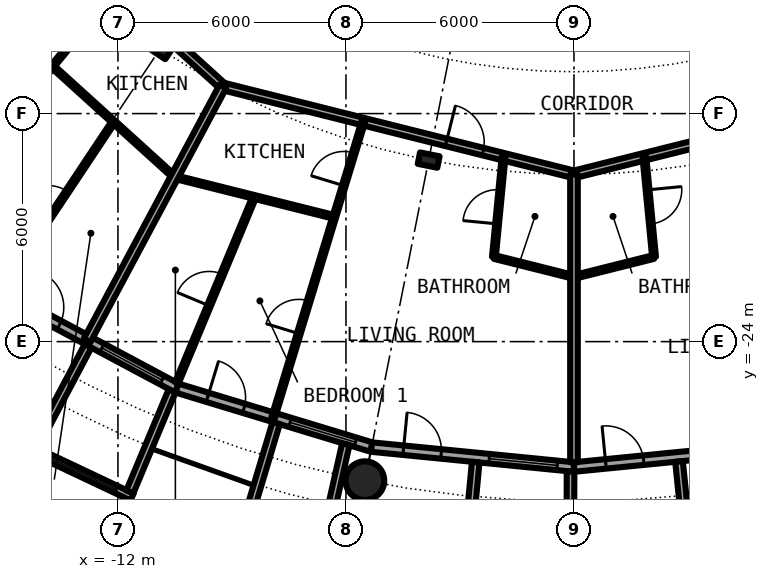
"""IFC4 building model, lengths in metres.
Left out: names, types, materials, properties, quantities, classifications, styles, units other than length and angle.
Written with IfcOpenShell. Run it as: python <this file> out.ifc"""

import sys

from ifc_helpers import new_model, si_unit, direction, frame, frame_2d, origin, origin_2d, place, context, subcontext, project, spatial, rectangle, circle, hollow_circle, i_section, extrude, element, fill, save


model = new_model("IFC4")
c1 = context("Model", 3, precision=1e-05, world=origin(), true_north=direction((0.0, 1.0)))
c2 = subcontext(c1, "Body", "Model", "MODEL_VIEW")
j1 = project(units=[si_unit("LENGTHUNIT", "METRE"), si_unit("PLANEANGLEUNIT", "RADIAN")], contexts=[c1])
p1 = place(None, origin())
s1 = spatial("IfcSite", under=j1, at=p1, CompositionType="ELEMENT")
p2 = place(p1, origin())
s2 = spatial("IfcBuilding", under=s1, at=p2, CompositionType="ELEMENT")
p3 = place(p2, frame((0.0, 0.0, 81.9)))
s3 = spatial("IfcBuildingStorey", under=s2, at=p3, CompositionType="ELEMENT", Elevation=81.9)
p4 = place(p3, frame((-5.501, -27.658, 0.0), z_axis=(0.0, 0.0, 1.0), x_axis=(1.0, 0.0, 0.0)))
e1 = element("IfcColumn", 1, at=p4, inside=s3, PredefinedType="COLUMN", context=c2, shape_type="SweptSolid", body=[
    extrude(hollow_circle(Radius=0.508, WallThickness=0.04, at=origin_2d()), origin(), (0.0, 0.0, 1.0), 3.05),
])
for number, where, z_axis, x_axis in (
    (2, (-10.889, -16.297, 0.0), (0.0, 0.0, 1.0), (-0.556, -0.831, 0.0)),
    (3, (-3.824, -19.223, 0.0), (0.0, 0.0, 1.0), (-0.195, -0.981, 0.0)),
):
    element("IfcColumn", number, at=place(p3, frame(where, z_axis=z_axis, x_axis=x_axis)), inside=s3, PredefinedType="COLUMN", context=c2, shape_type="SweptSolid", body=[
        extrude(i_section(OverallWidth=0.306, OverallDepth=0.524, WebThickness=0.021, FlangeThickness=0.04, FilletRadius=0.027, at=origin_2d()), origin(), (0.0, 0.0, 1.0), 3.05),
    ])
p5 = place(p3, frame((-15.167, -22.699, 0.0), z_axis=(0.0, 0.0, 1.0), x_axis=(0.881915646801, -0.471407246368, 0.0)))
e4 = element("IfcWall", 4, at=p5, inside=s3, PredefinedType="SOLIDWALL", context=c2, shape_type="SweptSolid", body=[
    extrude(rectangle(XDim=5.352, YDim=0.25, at=frame_2d((2.676, 0.0))), origin(), (0.0, 0.0, 1.0), 2.7),
])
p6 = place(p5, frame((0.841, 0.0, 0.0)))
e5 = element("IfcOpeningElement", 5, at=p6, cuts=e4, PredefinedType="OPENING", context=c2, shape_type="SweptSolid", body=[
    extrude(rectangle(XDim=1.0, YDim=2.2, at=frame_2d((0.5, 1.1))), frame((0.0, 0.135, 0.0), z_axis=(0.0, -1.0, 0.0), x_axis=(1.0, 0.0, 0.0)), (0.0, 0.0, 1.0), 0.27),
])
p7 = place(p5, frame((3.111, 0.0, 0.3)))
e6 = element("IfcOpeningElement", 6, at=p7, cuts=e4, PredefinedType="OPENING", context=c2, shape_type="SweptSolid", body=[
    extrude(rectangle(XDim=1.8, YDim=2.1, at=frame_2d((0.9, 1.05))), frame((0.0, 0.135, 0.0), z_axis=(0.0, -1.0, 0.0), x_axis=(1.0, 0.0, 0.0)), (0.0, 0.0, 1.0), 0.27),
])
p8 = place(p3, frame((-14.335, -26.808, -0.03), z_axis=(0.0, 0.0, 1.0), x_axis=(0.904000060331, -0.427532327342, 0.0)))
e7 = element("IfcWall", 7, at=p8, inside=s3, PredefinedType="SOLIDWALL", context=c2, shape_type="SweptSolid", body=[
    extrude(rectangle(XDim=2.993, YDim=0.2, at=frame_2d((1.497, 0.0))), origin(), (0.0, 0.0, 1.0), 2.73),
])
p9 = place(p8, frame((0.457, 0.0, 0.33)))
e8 = element("IfcOpeningElement", 8, at=p9, cuts=e7, PredefinedType="OPENING", context=c2, shape_type="SweptSolid", body=[
    extrude(circle(Radius=1.04, at=frame_2d((1.04, 1.04))), frame((0.0, 0.11, 0.0), z_axis=(0.0, -1.0, 0.0), x_axis=(1.0, 0.0, 0.0)), (0.0, 0.0, 1.0), 0.22),
])
p10 = place(p3, frame((-12.787, -24.113, -0.03), z_axis=(0.0, 0.0, 1.0), x_axis=(-0.468365282436, -0.883534924159, 0.0)))
e9 = element("IfcWall", 9, at=p10, inside=s3, PredefinedType="SOLIDWALL", context=c2, shape_type="SweptSolid", body=[
    extrude(rectangle(XDim=3.006, YDim=0.2, at=frame_2d((1.503, 0.0))), origin(), (0.0, 0.0, 1.0), 2.73),
])
p11 = place(p3, frame((-10.575, -25.295, -0.03), z_axis=(0.0, 0.0, 1.0), x_axis=(-0.385697364644, -0.922625353492, 0.0)))
e10 = element("IfcWall", 10, at=p11, inside=s3, PredefinedType="SOLIDWALL", context=c2, shape_type="SweptSolid", body=[
    extrude(rectangle(XDim=2.883, YDim=0.2, at=frame_2d((1.442, 0.0))), origin(), (0.0, 0.0, 1.0), 2.73),
])
p12 = place(p3, frame((-10.447, -25.222, 0.0), z_axis=(0.0, 0.0, 1.0), x_axis=(0.956965678721, -0.290201119486, 0.0)))
e11 = element("IfcWall", 11, at=p12, inside=s3, PredefinedType="SOLIDWALL", context=c2, shape_type="SweptSolid", body=[
    extrude(rectangle(XDim=5.351, YDim=0.25, at=frame_2d((2.676, 0.0))), origin(), (0.0, 0.0, 1.0), 2.7),
])
p13 = place(p12, frame((0.841, 0.0, 0.0)))
e12 = element("IfcOpeningElement", 12, at=p13, cuts=e11, PredefinedType="OPENING", context=c2, shape_type="SweptSolid", body=[
    extrude(rectangle(XDim=1.0, YDim=2.2, at=frame_2d((0.5, 1.1))), frame((0.0, 0.135, 0.0), z_axis=(0.0, -1.0, 0.0), x_axis=(1.0, 0.0, 0.0)), (0.0, 0.0, 1.0), 0.27),
])
p14 = place(p12, frame((3.111, 0.0, 0.3)))
e13 = element("IfcOpeningElement", 13, at=p14, cuts=e11, PredefinedType="OPENING", context=c2, shape_type="SweptSolid", body=[
    extrude(rectangle(XDim=1.8, YDim=2.1, at=frame_2d((0.9, 1.05))), frame((0.0, 0.135, 0.0), z_axis=(0.0, -1.0, 0.0), x_axis=(1.0, 0.0, 0.0)), (0.0, 0.0, 1.0), 0.27),
])
p15 = place(p3, frame((-7.837, -26.144, -0.03), z_axis=(0.0, 0.0, 1.0), x_axis=(-0.287064767992, -0.957911174889, 0.0)))
e14 = element("IfcWall", 14, at=p15, inside=s3, PredefinedType="SOLIDWALL", context=c2, shape_type="SweptSolid", body=[
    extrude(rectangle(XDim=3.006, YDim=0.2, at=frame_2d((1.503, 0.0))), origin(), (0.0, 0.0, 1.0), 2.73),
])
p16 = place(p3, frame((-6.004, -26.7, -0.03), z_axis=(0.0, 0.0, 1.0), x_axis=(-0.219609259383, -0.975587911566, 0.0)))
e15 = element("IfcWall", 15, at=p16, inside=s3, PredefinedType="SOLIDWALL", context=c2, shape_type="SweptSolid", body=[
    extrude(rectangle(XDim=2.933, YDim=0.2, at=frame_2d((1.466, 0.0))), origin(), (0.0, 0.0, 1.0), 2.73),
])
p17 = place(p3, frame((-5.326, -26.775, 0.0), z_axis=(0.0, 0.0, 1.0), x_axis=(0.995173996315, -0.098126026407, 0.0)))
e16 = element("IfcWall", 16, at=p17, inside=s3, PredefinedType="SOLIDWALL", context=c2, shape_type="SweptSolid", body=[
    extrude(rectangle(XDim=5.352, YDim=0.25, at=frame_2d((2.676, 0.0))), origin(), (0.0, 0.0, 1.0), 2.7),
])
p18 = place(p17, frame((0.841, 0.0, 0.0)))
e17 = element("IfcOpeningElement", 17, at=p18, cuts=e16, PredefinedType="OPENING", context=c2, shape_type="SweptSolid", body=[
    extrude(rectangle(XDim=1.0, YDim=2.2, at=frame_2d((0.5, 1.1))), frame((0.0, 0.135, 0.0), z_axis=(0.0, -1.0, 0.0), x_axis=(1.0, 0.0, 0.0)), (0.0, 0.0, 1.0), 0.27),
])
p19 = place(p17, frame((3.111, 0.0, 0.3)))
e18 = element("IfcOpeningElement", 18, at=p19, cuts=e16, PredefinedType="OPENING", context=c2, shape_type="SweptSolid", body=[
    extrude(rectangle(XDim=1.8, YDim=2.1, at=frame_2d((0.9, 1.05))), frame((0.0, 0.135, 0.0), z_axis=(0.0, -1.0, 0.0), x_axis=(1.0, 0.0, 0.0)), (0.0, 0.0, 1.0), 0.27),
])
p20 = place(p3, frame((-2.586, -27.171, -0.03), z_axis=(0.0, 0.0, 1.0), x_axis=(-0.094548432284, -0.995520262954, 0.0)))
e19 = element("IfcWall", 19, at=p20, inside=s3, PredefinedType="SOLIDWALL", context=c2, shape_type="SweptSolid", body=[
    extrude(rectangle(XDim=3.006, YDim=0.2, at=frame_2d((1.503, 0.0))), origin(), (0.0, 0.0, 1.0), 2.73),
])
p21 = place(p3, frame((-0.09, -27.417, -0.03), z_axis=(0.0, 0.0, 1.0), x_axis=(-0.00347308367, -0.999993968827, 0.0)))
e20 = element("IfcWall", 20, at=p21, inside=s3, PredefinedType="SOLIDWALL", context=c2, shape_type="SweptSolid", body=[
    extrude(rectangle(XDim=2.882, YDim=0.2, at=frame_2d((1.441, 0.0))), origin(), (0.0, 0.0, 1.0), 2.73),
])
p22 = place(p3, frame((0.0, -27.3, 0.0), z_axis=(0.0, 0.0, 1.0), x_axis=(0.995173996315, 0.098126026407, 0.0)))
e21 = element("IfcWall", 21, at=p22, inside=s3, PredefinedType="SOLIDWALL", context=c2, shape_type="SweptSolid", body=[
    extrude(rectangle(XDim=5.352, YDim=0.25, at=frame_2d((2.676, 0.0))), origin(), (0.0, 0.0, 1.0), 2.7),
])
p23 = place(p22, frame((0.841, 0.0, 0.0)))
e22 = element("IfcOpeningElement", 22, at=p23, cuts=e21, PredefinedType="OPENING", context=c2, shape_type="SweptSolid", body=[
    extrude(rectangle(XDim=1.0, YDim=2.2, at=frame_2d((0.5, 1.1))), frame((0.0, 0.135, 0.0), z_axis=(0.0, -1.0, 0.0), x_axis=(1.0, 0.0, 0.0)), (0.0, 0.0, 1.0), 0.27),
])
p24 = place(p22, frame((3.111, 0.0, 0.3)))
e23 = element("IfcOpeningElement", 23, at=p24, cuts=e21, PredefinedType="OPENING", context=c2, shape_type="SweptSolid", body=[
    extrude(rectangle(XDim=1.8, YDim=2.1, at=frame_2d((0.9, 1.05))), frame((0.0, 0.135, 0.0), z_axis=(0.0, -1.0, 0.0), x_axis=(1.0, 0.0, 0.0)), (0.0, 0.0, 1.0), 0.27),
])
p25 = place(p3, frame((2.764, -27.153, -0.03), z_axis=(0.0, 0.0, 1.0), x_axis=(0.101505487237, -0.994834979311, 0.0)))
e24 = element("IfcWall", 24, at=p25, inside=s3, PredefinedType="SOLIDWALL", context=c2, shape_type="SweptSolid", body=[
    extrude(rectangle(XDim=3.007, YDim=0.2, at=frame_2d((1.503, 0.0))), origin(), (0.0, 0.0, 1.0), 2.73),
])
p26 = place(p3, frame((-13.727, -16.754, 0.0), z_axis=(0.0, 0.0, 1.0), x_axis=(0.740840803797, -0.671680655839, 0.0)))
e25 = element("IfcWall", 25, at=p26, inside=s3, PredefinedType="PARTITIONING", context=c2, shape_type="SweptSolid", body=[
    extrude(rectangle(XDim=4.338, YDim=0.1, at=frame_2d((2.169, 0.0))), origin(), (0.0, 0.0, 1.0), 2.7),
])
p27 = place(p3, frame((-10.516, -19.666, 0.0), z_axis=(0.0, 0.0, 1.0), x_axis=(0.97005315629, -0.242892721118, 0.0)))
e26 = element("IfcWall", 26, at=p27, inside=s3, PredefinedType="PARTITIONING", context=c2, shape_type="SweptSolid", body=[
    extrude(rectangle(XDim=4.343, YDim=0.1, at=frame_2d((2.172, 0.0))), origin(), (0.0, 0.0, 1.0), 2.7),
])
for number, where, z_axis, x_axis in (
    (27, (-2.096, -21.774, 0.0), (0.0, 0.0, 1.0), (0.97, -0.243, 0.0)),
    (28, (-0.006, -22.301, 0.0), (0.0, 0.0, 1.0), (0.97, 0.243, 0.0)),
):
    element("IfcWall", number, at=place(p3, frame(where, z_axis=z_axis, x_axis=x_axis)), inside=s3, PredefinedType="PARTITIONING", context=c2, shape_type="SweptSolid", body=[
        extrude(rectangle(XDim=2.167, YDim=0.1, at=frame_2d((1.083, 0.0))), origin(), (0.0, 0.0, 1.0), 2.7),
    ])
p28 = place(p3, frame((-16.179, -10.995, 0.0), z_axis=(0.0, 0.0, 1.0), x_axis=(0.740909940942, -0.671604392044, 0.0)))
e29 = element("IfcWall", 29, at=p28, inside=s3, PredefinedType="PARTITIONING", context=c2, shape_type="SweptSolid", body=[
    extrude(rectangle(XDim=9.367, YDim=0.2, at=frame_2d((4.683, 0.0))), origin(), (0.0, 0.0, 1.0), 2.38),
])
p29 = place(p28, frame((3.152, 0.0, 0.0)))
e30 = element("IfcOpeningElement", 30, at=p29, cuts=e29, PredefinedType="OPENING", context=c2, shape_type="SweptSolid", body=[
    extrude(rectangle(XDim=1.0, YDim=2.3, at=frame_2d((0.5, 1.15))), frame((0.0, 0.11, 0.0), z_axis=(0.0, -1.0, 0.0), x_axis=(1.0, 0.0, 0.0)), (0.0, 0.0, 1.0), 0.22),
])
p30 = place(p3, frame((-9.242, -17.284, 0.0), z_axis=(0.0, 0.0, 1.0), x_axis=(0.970002158938, -0.243096301198, 0.0)))
e31 = element("IfcWall", 31, at=p30, inside=s3, PredefinedType="PARTITIONING", context=c2, shape_type="SweptSolid", body=[
    extrude(rectangle(XDim=9.528, YDim=0.2, at=frame_2d((4.764, 0.0))), origin(), (0.0, 0.0, 1.0), 2.38),
])
p31 = place(p30, frame((6.062, 0.0, 0.0)))
e32 = element("IfcOpeningElement", 32, at=p31, cuts=e31, PredefinedType="OPENING", context=c2, shape_type="SweptSolid", body=[
    extrude(rectangle(XDim=1.0, YDim=2.3, at=frame_2d((0.5, 1.15))), frame((0.0, 0.11, 0.0), z_axis=(0.0, -1.0, 0.0), x_axis=(1.0, 0.0, 0.0)), (0.0, 0.0, 1.0), 0.22),
])
p32 = place(p3, frame((0.0, -19.6, 0.0), z_axis=(0.0, 0.0, 1.0), x_axis=(0.970002158938, 0.243096301198, 0.0)))
e33 = element("IfcWall", 33, at=p32, inside=s3, PredefinedType="PARTITIONING", context=c2, shape_type="SweptSolid", body=[
    extrude(rectangle(XDim=9.528, YDim=0.2, at=frame_2d((4.764, 0.0))), origin(), (0.0, 0.0, 1.0), 2.38),
])
p33 = place(p32, frame((4.155, 0.0, 0.0)))
e34 = element("IfcOpeningElement", 34, at=p33, cuts=e33, PredefinedType="OPENING", context=c2, shape_type="SweptSolid", body=[
    extrude(rectangle(XDim=1.0, YDim=2.3, at=frame_2d((0.5, 1.15))), frame((0.0, 0.11, 0.0), z_axis=(0.0, -1.0, 0.0), x_axis=(1.0, 0.0, 0.0)), (0.0, 0.0, 1.0), 0.22),
])
p34 = place(p3, frame((-17.219, -21.023, 0.0), z_axis=(0.0, 0.0, 1.0), x_axis=(0.633664062855, 0.773608334654, 0.0)))
e35 = element("IfcWall", 35, at=p34, inside=s3, PredefinedType="PARTITIONING", context=c2, shape_type="SweptSolid", body=[
    extrude(rectangle(XDim=8.138, YDim=0.1, at=frame_2d((4.069, 0.0))), origin(), (0.0, 0.0, 1.0), 2.7),
])
p35 = place(p34, frame((6.377, 0.0, 0.0)))
e36 = element("IfcOpeningElement", 36, at=p35, cuts=e35, PredefinedType="OPENING", context=c2, shape_type="SweptSolid", body=[
    extrude(rectangle(XDim=0.9, YDim=2.3, at=frame_2d((0.45, 1.15))), frame((0.0, 0.06, 0.0), z_axis=(0.0, -1.0, 0.0), x_axis=(1.0, 0.0, 0.0)), (0.0, 0.0, 1.0), 0.12),
])
p36 = place(p34, frame((2.308, 0.0, 0.0)))
e37 = element("IfcOpeningElement", 37, at=p36, cuts=e35, PredefinedType="OPENING", context=c2, shape_type="SweptSolid", body=[
    extrude(rectangle(XDim=0.9, YDim=2.3, at=frame_2d((0.45, 1.15))), frame((0.0, 0.06, 0.0), z_axis=(0.0, -1.0, 0.0), x_axis=(1.0, 0.0, 0.0)), (0.0, 0.0, 1.0), 0.12),
])
p37 = place(p3, frame((-15.051, -22.626, 0.0), z_axis=(0.0, 0.0, 1.0), x_axis=(0.553913391217, 0.832574294, 0.0)))
e38 = element("IfcWall", 38, at=p37, inside=s3, PredefinedType="PARTITIONING", context=c2, shape_type="SweptSolid", body=[
    extrude(rectangle(XDim=5.301, YDim=0.1, at=frame_2d((2.65, 0.0))), origin(), (0.0, 0.0, 1.0), 2.7),
])
p38 = place(p37, frame((2.2, 0.0, 0.0)))
e39 = element("IfcOpeningElement", 39, at=p38, cuts=e38, PredefinedType="OPENING", context=c2, shape_type="SweptSolid", body=[
    extrude(rectangle(XDim=0.9, YDim=2.3, at=frame_2d((0.45, 1.15))), frame((0.0, 0.06, 0.0), z_axis=(0.0, -1.0, 0.0), x_axis=(1.0, 0.0, 0.0)), (0.0, 0.0, 1.0), 0.12),
])
p39 = place(p3, frame((-12.81, -23.966, 0.0), z_axis=(0.0, 0.0, 1.0), x_axis=(0.471439510802, 0.881898399848, 0.0)))
e40 = element("IfcWall", 40, at=p39, inside=s3, PredefinedType="PARTITIONING", context=c2, shape_type="SweptSolid", body=[
    extrude(rectangle(XDim=7.575, YDim=0.2, at=frame_2d((3.787, 0.0))), origin(), (0.0, 0.0, 1.0), 2.7),
])
p40 = place(p3, frame((-10.45, -25.085, 0.0), z_axis=(0.0, 0.0, 1.0), x_axis=(0.384464934183, 0.923139596369, 0.0)))
e41 = element("IfcWall", 41, at=p40, inside=s3, PredefinedType="PARTITIONING", context=c2, shape_type="SweptSolid", body=[
    extrude(rectangle(XDim=5.301, YDim=0.1, at=frame_2d((2.65, 0.0))), origin(), (0.0, 0.0, 1.0), 2.7),
])
p41 = place(p40, frame((2.2, 0.0, 0.0)))
e42 = element("IfcOpeningElement", 42, at=p41, cuts=e41, PredefinedType="OPENING", context=c2, shape_type="SweptSolid", body=[
    extrude(rectangle(XDim=0.9, YDim=2.3, at=frame_2d((0.45, 1.15))), frame((0.0, 0.06, 0.0), z_axis=(0.0, -1.0, 0.0), x_axis=(1.0, 0.0, 0.0)), (0.0, 0.0, 1.0), 0.12),
])
p42 = place(p3, frame((-7.914, -25.997, 0.0), z_axis=(0.0, 0.0, 1.0), x_axis=(0.291319167605, 0.956625915698, 0.0)))
e43 = element("IfcWall", 43, at=p42, inside=s3, PredefinedType="PARTITIONING", context=c2, shape_type="SweptSolid", body=[
    extrude(rectangle(XDim=8.139, YDim=0.1, at=frame_2d((4.07, 0.0))), origin(), (0.0, 0.0, 1.0), 2.7),
])
p43 = place(p42, frame((6.377, 0.0, 0.0)))
e44 = element("IfcOpeningElement", 44, at=p43, cuts=e43, PredefinedType="OPENING", context=c2, shape_type="SweptSolid", body=[
    extrude(rectangle(XDim=0.9, YDim=2.3, at=frame_2d((0.45, 1.15))), frame((0.0, 0.06, 0.0), z_axis=(0.0, -1.0, 0.0), x_axis=(1.0, 0.0, 0.0)), (0.0, 0.0, 1.0), 0.12),
])
p44 = place(p42, frame((2.308, 0.0, 0.0)))
e45 = element("IfcOpeningElement", 45, at=p44, cuts=e43, PredefinedType="OPENING", context=c2, shape_type="SweptSolid", body=[
    extrude(rectangle(XDim=0.9, YDim=2.3, at=frame_2d((0.45, 1.15))), frame((0.0, 0.06, 0.0), z_axis=(0.0, -1.0, 0.0), x_axis=(1.0, 0.0, 0.0)), (0.0, 0.0, 1.0), 0.12),
])
p45 = place(p3, frame((-2.107, -21.772, 0.0), z_axis=(0.0, 0.0, 1.0), x_axis=(0.09627998515, 0.995354290923, 0.0)))
e46 = element("IfcWall", 46, at=p45, inside=s3, PredefinedType="PARTITIONING", context=c2, shape_type="SweptSolid", body=[
    extrude(rectangle(XDim=2.647, YDim=0.1, at=frame_2d((1.324, 0.0))), origin(), (0.0, 0.0, 1.0), 2.7),
])
p46 = place(p45, frame((0.874, 0.0, 0.0)))
e47 = element("IfcOpeningElement", 47, at=p46, cuts=e46, PredefinedType="OPENING", context=c2, shape_type="SweptSolid", body=[
    extrude(rectangle(XDim=0.9, YDim=2.3, at=frame_2d((0.45, 1.15))), frame((0.0, 0.06, 0.0), z_axis=(0.0, -1.0, 0.0), x_axis=(1.0, 0.0, 0.0)), (0.0, 0.0, 1.0), 0.12),
])
p47 = place(p3, frame((0.0, -27.175, 0.0), z_axis=(0.0, 0.0, 1.0), x_axis=(0.0, 1.0, 0.0)))
e48 = element("IfcWall", 48, at=p47, inside=s3, PredefinedType="PARTITIONING", context=c2, shape_type="SweptSolid", body=[
    extrude(rectangle(XDim=7.575, YDim=0.2, at=frame_2d((3.788, 0.0))), origin(), (0.0, 0.0, 1.0), 2.7),
])
p48 = place(p3, frame((1.852, -19.137, 0.0), z_axis=(0.0, 0.0, 1.0), x_axis=(0.09627998515, -0.995354290923, 0.0)))
e49 = element("IfcWall", 49, at=p48, inside=s3, PredefinedType="PARTITIONING", context=c2, shape_type="SweptSolid", body=[
    extrude(rectangle(XDim=2.647, YDim=0.1, at=frame_2d((1.324, 0.0))), origin(), (0.0, 0.0, 1.0), 2.7),
])
p49 = place(p48, frame((0.874, 0.0, 0.0)))
e50 = element("IfcOpeningElement", 50, at=p49, cuts=e49, PredefinedType="OPENING", context=c2, shape_type="SweptSolid", body=[
    extrude(rectangle(XDim=0.9, YDim=2.3, at=frame_2d((0.45, 1.15))), frame((0.0, 0.06, 0.0), z_axis=(0.0, -1.0, 0.0), x_axis=(1.0, 0.0, 0.0)), (0.0, 0.0, 1.0), 0.12),
])
p50 = place(p6, origin())
e51 = element("IfcDoor", 51, at=p50, inside=s3, OperationType="SINGLE_SWING_LEFT", PredefinedType="DOOR", context=c2, shape_type="SweptSolid", body=[
    extrude(rectangle(XDim=1.0, YDim=2.2, at=frame_2d((0.5, 1.1))), frame((0.0, 0.025, 0.0), z_axis=(0.0, -1.0, 0.0), x_axis=(1.0, 0.0, 0.0)), (0.0, 0.0, 1.0), 0.05),
])
fill(e5, e51)
p51 = place(p7, origin())
e52 = element("IfcWindow", 52, at=p51, inside=s3, PartitioningType="SINGLE_PANEL", PredefinedType="WINDOW", context=c2, shape_type="SweptSolid", body=[
    extrude(rectangle(XDim=1.8, YDim=2.1, at=frame_2d((0.9, 1.05))), frame((0.0, 0.03, 0.0), z_axis=(0.0, -1.0, 0.0), x_axis=(1.0, 0.0, 0.0)), (0.0, 0.0, 1.0), 0.06),
])
fill(e6, e52)
p52 = place(p9, origin())
e53 = element("IfcWindow", 53, at=p52, inside=s3, PartitioningType="SINGLE_PANEL", PredefinedType="WINDOW", context=c2, shape_type="SweptSolid", body=[
    extrude(circle(Radius=1.04, at=frame_2d((1.04, 1.04))), frame((0.0, 0.03, 0.0), z_axis=(0.0, -1.0, 0.0), x_axis=(1.0, 0.0, 0.0)), (0.0, 0.0, 1.0), 0.06),
])
fill(e8, e53)
p53 = place(p13, origin())
e54 = element("IfcDoor", 54, at=p53, inside=s3, OperationType="SINGLE_SWING_LEFT", PredefinedType="DOOR", context=c2, shape_type="SweptSolid", body=[
    extrude(rectangle(XDim=1.0, YDim=2.2, at=frame_2d((0.5, 1.1))), frame((0.0, 0.025, 0.0), z_axis=(0.0, -1.0, 0.0), x_axis=(1.0, 0.0, 0.0)), (0.0, 0.0, 1.0), 0.05),
])
fill(e12, e54)
p54 = place(p14, origin())
e55 = element("IfcWindow", 55, at=p54, inside=s3, PartitioningType="SINGLE_PANEL", PredefinedType="WINDOW", context=c2, shape_type="SweptSolid", body=[
    extrude(rectangle(XDim=1.8, YDim=2.1, at=frame_2d((0.9, 1.05))), frame((0.0, 0.03, 0.0), z_axis=(0.0, -1.0, 0.0), x_axis=(1.0, 0.0, 0.0)), (0.0, 0.0, 1.0), 0.06),
])
fill(e13, e55)
p55 = place(p18, origin())
e56 = element("IfcDoor", 56, at=p55, inside=s3, OperationType="SINGLE_SWING_LEFT", PredefinedType="DOOR", context=c2, shape_type="SweptSolid", body=[
    extrude(rectangle(XDim=1.0, YDim=2.2, at=frame_2d((0.5, 1.1))), frame((0.0, 0.025, 0.0), z_axis=(0.0, -1.0, 0.0), x_axis=(1.0, 0.0, 0.0)), (0.0, 0.0, 1.0), 0.05),
])
fill(e17, e56)
p56 = place(p19, origin())
e57 = element("IfcWindow", 57, at=p56, inside=s3, PartitioningType="SINGLE_PANEL", PredefinedType="WINDOW", context=c2, shape_type="SweptSolid", body=[
    extrude(rectangle(XDim=1.8, YDim=2.1, at=frame_2d((0.9, 1.05))), frame((0.0, 0.03, 0.0), z_axis=(0.0, -1.0, 0.0), x_axis=(1.0, 0.0, 0.0)), (0.0, 0.0, 1.0), 0.06),
])
fill(e18, e57)
p57 = place(p23, origin())
e58 = element("IfcDoor", 58, at=p57, inside=s3, OperationType="SINGLE_SWING_LEFT", PredefinedType="DOOR", context=c2, shape_type="SweptSolid", body=[
    extrude(rectangle(XDim=1.0, YDim=2.2, at=frame_2d((0.5, 1.1))), frame((0.0, 0.025, 0.0), z_axis=(0.0, -1.0, 0.0), x_axis=(1.0, 0.0, 0.0)), (0.0, 0.0, 1.0), 0.05),
])
fill(e22, e58)
p58 = place(p38, origin())
e59 = element("IfcDoor", 59, at=p58, inside=s3, OperationType="SINGLE_SWING_RIGHT", PredefinedType="DOOR", context=c2, shape_type="SweptSolid", body=[
    extrude(rectangle(XDim=0.9, YDim=2.3, at=frame_2d((0.45, 1.15))), frame((0.0, 0.025, 0.0), z_axis=(0.0, -1.0, 0.0), x_axis=(1.0, 0.0, 0.0)), (0.0, 0.0, 1.0), 0.05),
])
fill(e39, e59)
p59 = place(p31, origin())
e60 = element("IfcDoor", 60, at=p59, inside=s3, OperationType="SINGLE_SWING_RIGHT", PredefinedType="DOOR", context=c2, shape_type="SweptSolid", body=[
    extrude(rectangle(XDim=1.0, YDim=2.3, at=frame_2d((0.5, 1.15))), frame((0.0, 0.025, 0.0), z_axis=(0.0, -1.0, 0.0), x_axis=(1.0, 0.0, 0.0)), (0.0, 0.0, 1.0), 0.05),
])
fill(e32, e60)
p60 = place(p46, origin())
e61 = element("IfcDoor", 61, at=p60, inside=s3, OperationType="SINGLE_SWING_LEFT", PredefinedType="DOOR", context=c2, shape_type="SweptSolid", body=[
    extrude(rectangle(XDim=0.9, YDim=2.3, at=frame_2d((0.45, 1.15))), frame((0.0, 0.025, 0.0), z_axis=(0.0, -1.0, 0.0), x_axis=(1.0, 0.0, 0.0)), (0.0, 0.0, 1.0), 0.05),
])
fill(e47, e61)
p61 = place(p43, origin())
e62 = element("IfcDoor", 62, at=p61, inside=s3, OperationType="SINGLE_SWING_RIGHT", PredefinedType="DOOR", context=c2, shape_type="SweptSolid", body=[
    extrude(rectangle(XDim=0.9, YDim=2.3, at=frame_2d((0.45, 1.15))), frame((0.0, 0.025, 0.0), z_axis=(0.0, -1.0, 0.0), x_axis=(1.0, 0.0, 0.0)), (0.0, 0.0, 1.0), 0.05),
])
fill(e44, e62)
p62 = place(p44, origin())
e63 = element("IfcDoor", 63, at=p62, inside=s3, OperationType="SINGLE_SWING_LEFT", PredefinedType="DOOR", context=c2, shape_type="SweptSolid", body=[
    extrude(rectangle(XDim=0.9, YDim=2.3, at=frame_2d((0.45, 1.15))), frame((0.0, 0.025, 0.0), z_axis=(0.0, -1.0, 0.0), x_axis=(1.0, 0.0, 0.0)), (0.0, 0.0, 1.0), 0.05),
])
fill(e45, e63)
p63 = place(p41, origin())
e64 = element("IfcDoor", 64, at=p63, inside=s3, OperationType="SINGLE_SWING_RIGHT", PredefinedType="DOOR", context=c2, shape_type="SweptSolid", body=[
    extrude(rectangle(XDim=0.9, YDim=2.3, at=frame_2d((0.45, 1.15))), frame((0.0, 0.025, 0.0), z_axis=(0.0, -1.0, 0.0), x_axis=(1.0, 0.0, 0.0)), (0.0, 0.0, 1.0), 0.05),
])
fill(e42, e64)
p64 = place(p49, origin())
e65 = element("IfcDoor", 65, at=p64, inside=s3, OperationType="SINGLE_SWING_RIGHT", PredefinedType="DOOR", context=c2, shape_type="SweptSolid", body=[
    extrude(rectangle(XDim=0.9, YDim=2.3, at=frame_2d((0.45, 1.15))), frame((0.0, 0.025, 0.0), z_axis=(0.0, -1.0, 0.0), x_axis=(1.0, 0.0, 0.0)), (0.0, 0.0, 1.0), 0.05),
])
fill(e50, e65)
save(model, sys.argv[1])
